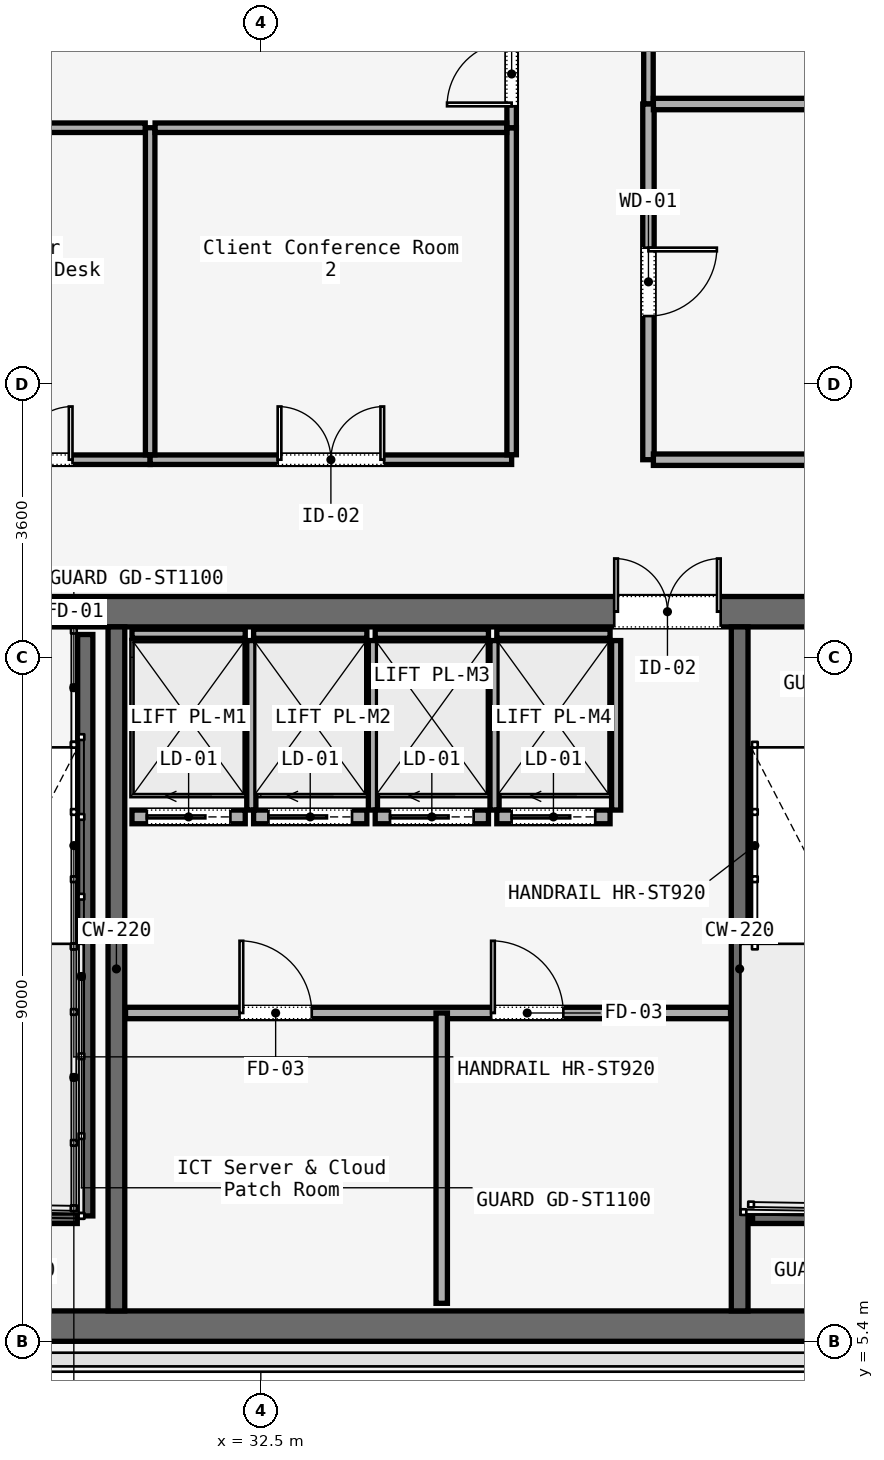
"""IFC4 building model, lengths in metres.
Left out: names, types, materials, properties, quantities, classifications, styles, units other than length and angle.
Written with IfcOpenShell. Run it as: python <this file> out.ifc"""

import sys

from ifc_helpers import new_model, si_unit, direction, frame, frame_2d, origin, place, context, subcontext, project, spatial, rectangle, extrude, element, fill, save


model = new_model("IFC4")
c1 = context("Model", 3, precision=1e-05, world=origin(), true_north=direction((0.0, 1.0)))
c2 = subcontext(c1, "Body", "Model", "MODEL_VIEW")
j1 = project(units=[si_unit("LENGTHUNIT", "METRE"), si_unit("PLANEANGLEUNIT", "RADIAN")], contexts=[c1])
p1 = place(None, origin())
s1 = spatial("IfcSite", under=j1, at=p1, CompositionType="ELEMENT")
p2 = place(p1, origin())
s2 = spatial("IfcBuilding", under=s1, at=p2, CompositionType="ELEMENT")
p3 = place(p2, frame((0.0, 0.0, 176.4)))
s3 = spatial("IfcBuildingStorey", under=s2, at=p3, CompositionType="ELEMENT", Elevation=176.4)
p4 = place(p3, frame((26.45, 15.0, 0.0), z_axis=(0.0, 0.0, 1.0), x_axis=(1.0, 0.0, 0.0)))
e1 = element("IfcWall", 1, at=p4, inside=s3, PredefinedType="SOLIDWALL", context=c2, shape_type="SweptSolid", body=[
    extrude(rectangle(XDim=31.1, YDim=0.4, at=frame_2d((15.55, 0.0))), origin(), (0.0, 0.0, 1.0), 3.58),
])
p5 = place(p4, frame((1.65, 0.0, 0.0)))
e2 = element("IfcOpeningElement", 2, at=p5, cuts=e1, PredefinedType="OPENING", context=c2, shape_type="SweptSolid", body=[
    extrude(rectangle(XDim=1.1, YDim=2.2, at=frame_2d((0.55, 1.1))), frame((0.0, 0.2, 0.0), z_axis=(0.0, -1.0, 0.0), x_axis=(1.0, 0.0, 0.0)), (0.0, 0.0, 1.0), 0.4),
])
p6 = place(p4, frame((13.65, 0.0, 0.0)))
e3 = element("IfcOpeningElement", 3, at=p6, cuts=e1, PredefinedType="OPENING", context=c2, shape_type="SweptSolid", body=[
    extrude(rectangle(XDim=1.1, YDim=2.2, at=frame_2d((0.55, 1.1))), frame((0.0, 0.2, 0.0), z_axis=(0.0, -1.0, 0.0), x_axis=(1.0, 0.0, 0.0)), (0.0, 0.0, 1.0), 0.4),
])
p7 = place(p4, frame((25.55, 0.0, 0.0)))
e4 = element("IfcOpeningElement", 4, at=p7, cuts=e1, PredefinedType="OPENING", context=c2, shape_type="SweptSolid", body=[
    extrude(rectangle(XDim=1.1, YDim=2.2, at=frame_2d((0.55, 1.1))), frame((0.0, 0.2, 0.0), z_axis=(0.0, -1.0, 0.0), x_axis=(1.0, 0.0, 0.0)), (0.0, 0.0, 1.0), 0.4),
])
p8 = place(p4, frame((10.7, 0.0, 0.0)))
e5 = element("IfcOpeningElement", 5, at=p8, cuts=e1, PredefinedType="OPENING", context=c2, shape_type="SweptSolid", body=[
    extrude(rectangle(XDim=1.4, YDim=2.2, at=frame_2d((0.7, 1.1))), frame((0.0, 0.2, 0.0), z_axis=(0.0, -1.0, 0.0), x_axis=(1.0, 0.0, 0.0)), (0.0, 0.0, 1.0), 0.4),
])
p9 = place(p4, frame((19.35, 0.0, 0.0)))
e6 = element("IfcOpeningElement", 6, at=p9, cuts=e1, PredefinedType="OPENING", context=c2, shape_type="SweptSolid", body=[
    extrude(rectangle(XDim=1.1, YDim=2.2, at=frame_2d((0.55, 1.1))), frame((0.0, 0.2, 0.0), z_axis=(0.0, -1.0, 0.0), x_axis=(1.0, 0.0, 0.0)), (0.0, 0.0, 1.0), 0.4),
])
p10 = place(p4, frame((21.4, 0.0, 0.0)))
e7 = element("IfcOpeningElement", 7, at=p10, cuts=e1, PredefinedType="OPENING", context=c2, shape_type="SweptSolid", body=[
    extrude(rectangle(XDim=0.9, YDim=2.1, at=frame_2d((0.45, 1.05))), frame((0.0, 0.2, 0.0), z_axis=(0.0, -1.0, 0.0), x_axis=(1.0, 0.0, 0.0)), (0.0, 0.0, 1.0), 0.4),
])
p11 = place(p4, frame((23.35, 0.0, 0.0)))
e8 = element("IfcOpeningElement", 8, at=p11, cuts=e1, PredefinedType="OPENING", context=c2, shape_type="SweptSolid", body=[
    extrude(rectangle(XDim=1.3, YDim=2.3, at=frame_2d((0.65, 1.15))), frame((0.0, 0.2, 0.0), z_axis=(0.0, -1.0, 0.0), x_axis=(1.0, 0.0, 0.0)), (0.0, 0.0, 1.0), 0.4),
])
p12 = place(p3, frame((26.45, 5.6, 0.0), z_axis=(0.0, 0.0, 1.0), x_axis=(1.0, 0.0, 0.0)))
e9 = element("IfcWall", 9, at=p12, inside=s3, PredefinedType="SOLIDWALL", context=c2, shape_type="SweptSolid", body=[
    extrude(rectangle(XDim=31.1, YDim=0.4, at=frame_2d((15.55, 0.0))), origin(), (0.0, 0.0, 1.0), 3.58),
])
for number, where, z_axis, x_axis in (
    (10, (30.6, 5.8, 0.0), (0.0, 0.0, 1.0), (0.0, 1.0, 0.0)),
    (11, (38.8, 5.8, 0.0), (0.0, 0.0, 1.0), (0.0, 1.0, 0.0)),
):
    element("IfcWall", number, at=place(p3, frame(where, z_axis=z_axis, x_axis=x_axis)), inside=s3, PredefinedType="SOLIDWALL", context=c2, shape_type="SweptSolid", body=[
        extrude(rectangle(XDim=9.0, YDim=0.22, at=frame_2d((4.5, 0.0))), origin(), (0.0, 0.0, 1.0), 3.58),
    ])
p13 = place(p3, frame((30.19, 14.7, 0.0), z_axis=(0.0, 0.0, 1.0), x_axis=(0.0, -1.0, 0.0)))
e12 = element("IfcWall", 12, at=p13, inside=s3, PredefinedType="SOLIDWALL", context=c2, shape_type="SweptSolid", body=[
    extrude(rectangle(XDim=7.65, YDim=0.2, at=frame_2d((3.825, 0.0))), origin(), (0.0, 0.0, 1.0), 3.8),
])
for number, where, z_axis, x_axis in (
    (13, (26.97, 7.05, 0.0), (0.0, 0.0, 1.0), (1.0, 0.0, 0.0)),
    (14, (38.97, 7.05, 0.0), (0.0, 0.0, 1.0), (1.0, 0.0, 0.0)),
):
    element("IfcWall", number, at=place(p3, frame(where, z_axis=z_axis, x_axis=x_axis)), inside=s3, PredefinedType="SOLIDWALL", context=c2, shape_type="SweptSolid", body=[
        extrude(rectangle(XDim=3.115, YDim=0.2, at=frame_2d((1.558, 0.0))), origin(), (0.0, 0.0, 1.0), 3.8),
    ])
p14 = place(p3, frame((30.72, 9.72, 0.0), z_axis=(0.0, 0.0, 1.0), x_axis=(1.0, 0.0, 0.0)))
e15 = element("IfcWall", 15, at=p14, inside=s3, PredefinedType="PARTITIONING", context=c2, shape_type="SweptSolid", body=[
    extrude(rectangle(XDim=7.96, YDim=0.15, at=frame_2d((3.98, 0.0))), origin(), (0.0, 0.0, 1.0), 3.01),
])
p15 = place(p14, frame((1.5, 0.0, 0.0)))
e16 = element("IfcOpeningElement", 16, at=p15, cuts=e15, PredefinedType="OPENING", context=c2, shape_type="SweptSolid", body=[
    extrude(rectangle(XDim=0.95, YDim=2.2, at=frame_2d((0.475, 1.1))), frame((0.0, 0.075, 0.0), z_axis=(0.0, -1.0, 0.0), x_axis=(1.0, 0.0, 0.0)), (0.0, 0.0, 1.0), 0.15),
])
p16 = place(p14, frame((4.81, 0.0, 0.0)))
e17 = element("IfcOpeningElement", 17, at=p16, cuts=e15, PredefinedType="OPENING", context=c2, shape_type="SweptSolid", body=[
    extrude(rectangle(XDim=0.95, YDim=2.2, at=frame_2d((0.475, 1.1))), frame((0.0, 0.075, 0.0), z_axis=(0.0, -1.0, 0.0), x_axis=(1.0, 0.0, 0.0)), (0.0, 0.0, 1.0), 0.15),
])
p17 = place(p3, frame((34.88, 5.9, 0.0), z_axis=(0.0, 0.0, 1.0), x_axis=(0.0, 1.0, 0.0)))
e18 = element("IfcWall", 18, at=p17, inside=s3, PredefinedType="PARTITIONING", context=c2, shape_type="SweptSolid", body=[
    extrude(rectangle(XDim=3.82, YDim=0.15, at=frame_2d((1.91, 0.0))), origin(), (0.0, 0.0, 1.0), 3.01),
])
p18 = place(p3, frame((30.805, 12.3, 0.0), z_axis=(0.0, 0.0, 1.0), x_axis=(1.0, 0.0, 0.0)))
e19 = element("IfcWall", 19, at=p18, inside=s3, PredefinedType="SOLIDWALL", context=c2, shape_type="SweptSolid", body=[
    extrude(rectangle(XDim=1.49, YDim=0.18, at=frame_2d((0.745, 0.0))), origin(), (0.0, 0.0, 1.0), 3.01),
])
p19 = place(p18, frame((0.195, 0.0, 0.0)))
e20 = element("IfcOpeningElement", 20, at=p19, cuts=e19, PredefinedType="OPENING", context=c2, shape_type="SweptSolid", body=[
    extrude(rectangle(XDim=1.1, YDim=2.2, at=frame_2d((0.55, 1.1))), frame((0.0, 0.09, 0.0), z_axis=(0.0, -1.0, 0.0), x_axis=(1.0, 0.0, 0.0)), (0.0, 0.0, 1.0), 0.18),
])
p20 = place(p3, frame((30.805, 14.71, 0.0), z_axis=(0.0, 0.0, 1.0), x_axis=(1.0, 0.0, 0.0)))
e21 = element("IfcWall", 21, at=p20, inside=s3, PredefinedType="SOLIDWALL", context=c2, shape_type="SweptSolid", body=[
    extrude(rectangle(XDim=1.49, YDim=0.12, at=frame_2d((0.745, 0.0))), origin(), (0.0, 0.0, 1.0), 3.01),
])
p21 = place(p3, frame((32.375, 12.39, 0.0), z_axis=(0.0, 0.0, 1.0), x_axis=(0.0, 1.0, 0.0)))
e22 = element("IfcWall", 22, at=p21, inside=s3, PredefinedType="SOLIDWALL", context=c2, shape_type="SweptSolid", body=[
    extrude(rectangle(XDim=2.23, YDim=0.12, at=frame_2d((1.115, 0.0))), origin(), (0.0, 0.0, 1.0), 3.01),
])
p22 = place(p3, frame((32.405, 12.3, 0.0), z_axis=(0.0, 0.0, 1.0), x_axis=(1.0, 0.0, 0.0)))
e23 = element("IfcWall", 23, at=p22, inside=s3, PredefinedType="SOLIDWALL", context=c2, shape_type="SweptSolid", body=[
    extrude(rectangle(XDim=1.49, YDim=0.18, at=frame_2d((0.745, 0.0))), origin(), (0.0, 0.0, 1.0), 3.01),
])
p23 = place(p22, frame((0.195, 0.0, 0.0)))
e24 = element("IfcOpeningElement", 24, at=p23, cuts=e23, PredefinedType="OPENING", context=c2, shape_type="SweptSolid", body=[
    extrude(rectangle(XDim=1.1, YDim=2.2, at=frame_2d((0.55, 1.1))), frame((0.0, 0.09, 0.0), z_axis=(0.0, -1.0, 0.0), x_axis=(1.0, 0.0, 0.0)), (0.0, 0.0, 1.0), 0.18),
])
p24 = place(p3, frame((32.405, 14.71, 0.0), z_axis=(0.0, 0.0, 1.0), x_axis=(1.0, 0.0, 0.0)))
e25 = element("IfcWall", 25, at=p24, inside=s3, PredefinedType="SOLIDWALL", context=c2, shape_type="SweptSolid", body=[
    extrude(rectangle(XDim=1.49, YDim=0.12, at=frame_2d((0.745, 0.0))), origin(), (0.0, 0.0, 1.0), 3.01),
])
p25 = place(p3, frame((33.975, 12.39, 0.0), z_axis=(0.0, 0.0, 1.0), x_axis=(0.0, 1.0, 0.0)))
e26 = element("IfcWall", 26, at=p25, inside=s3, PredefinedType="SOLIDWALL", context=c2, shape_type="SweptSolid", body=[
    extrude(rectangle(XDim=2.23, YDim=0.12, at=frame_2d((1.115, 0.0))), origin(), (0.0, 0.0, 1.0), 3.01),
])
p26 = place(p3, frame((34.005, 12.3, 0.0), z_axis=(0.0, 0.0, 1.0), x_axis=(1.0, 0.0, 0.0)))
e27 = element("IfcWall", 27, at=p26, inside=s3, PredefinedType="SOLIDWALL", context=c2, shape_type="SweptSolid", body=[
    extrude(rectangle(XDim=1.49, YDim=0.18, at=frame_2d((0.745, 0.0))), origin(), (0.0, 0.0, 1.0), 3.01),
])
p27 = place(p26, frame((0.195, 0.0, 0.0)))
e28 = element("IfcOpeningElement", 28, at=p27, cuts=e27, PredefinedType="OPENING", context=c2, shape_type="SweptSolid", body=[
    extrude(rectangle(XDim=1.1, YDim=2.2, at=frame_2d((0.55, 1.1))), frame((0.0, 0.09, 0.0), z_axis=(0.0, -1.0, 0.0), x_axis=(1.0, 0.0, 0.0)), (0.0, 0.0, 1.0), 0.18),
])
p28 = place(p3, frame((34.005, 14.71, 0.0), z_axis=(0.0, 0.0, 1.0), x_axis=(1.0, 0.0, 0.0)))
e29 = element("IfcWall", 29, at=p28, inside=s3, PredefinedType="SOLIDWALL", context=c2, shape_type="SweptSolid", body=[
    extrude(rectangle(XDim=1.49, YDim=0.12, at=frame_2d((0.745, 0.0))), origin(), (0.0, 0.0, 1.0), 3.01),
])
p29 = place(p3, frame((35.575, 12.39, 0.0), z_axis=(0.0, 0.0, 1.0), x_axis=(0.0, 1.0, 0.0)))
e30 = element("IfcWall", 30, at=p29, inside=s3, PredefinedType="SOLIDWALL", context=c2, shape_type="SweptSolid", body=[
    extrude(rectangle(XDim=2.23, YDim=0.12, at=frame_2d((1.115, 0.0))), origin(), (0.0, 0.0, 1.0), 3.01),
])
p30 = place(p3, frame((35.605, 12.3, 0.0), z_axis=(0.0, 0.0, 1.0), x_axis=(1.0, 0.0, 0.0)))
e31 = element("IfcWall", 31, at=p30, inside=s3, PredefinedType="SOLIDWALL", context=c2, shape_type="SweptSolid", body=[
    extrude(rectangle(XDim=1.49, YDim=0.18, at=frame_2d((0.745, 0.0))), origin(), (0.0, 0.0, 1.0), 3.01),
])
p31 = place(p30, frame((0.195, 0.0, 0.0)))
e32 = element("IfcOpeningElement", 32, at=p31, cuts=e31, PredefinedType="OPENING", context=c2, shape_type="SweptSolid", body=[
    extrude(rectangle(XDim=1.1, YDim=2.2, at=frame_2d((0.55, 1.1))), frame((0.0, 0.09, 0.0), z_axis=(0.0, -1.0, 0.0), x_axis=(1.0, 0.0, 0.0)), (0.0, 0.0, 1.0), 0.18),
])
p32 = place(p3, frame((35.605, 14.71, 0.0), z_axis=(0.0, 0.0, 1.0), x_axis=(1.0, 0.0, 0.0)))
e33 = element("IfcWall", 33, at=p32, inside=s3, PredefinedType="SOLIDWALL", context=c2, shape_type="SweptSolid", body=[
    extrude(rectangle(XDim=1.49, YDim=0.12, at=frame_2d((0.745, 0.0))), origin(), (0.0, 0.0, 1.0), 3.01),
])
p33 = place(p3, frame((37.175, 12.39, 0.0), z_axis=(0.0, 0.0, 1.0), x_axis=(0.0, 1.0, 0.0)))
e34 = element("IfcWall", 34, at=p33, inside=s3, PredefinedType="SOLIDWALL", context=c2, shape_type="SweptSolid", body=[
    extrude(rectangle(XDim=2.23, YDim=0.12, at=frame_2d((1.115, 0.0))), origin(), (0.0, 0.0, 1.0), 3.01),
])
p34 = place(p3, frame((27.6, 17.0, 0.0), z_axis=(0.0, 0.0, 1.0), x_axis=(1.0, 0.0, 0.0)))
e35 = element("IfcWall", 35, at=p34, inside=s3, PredefinedType="PARTITIONING", context=c2, shape_type="SweptSolid", body=[
    extrude(rectangle(XDim=3.444, YDim=0.125, at=frame_2d((1.722, 0.0))), origin(), (0.0, 0.0, 1.0), 3.01),
])
p35 = place(p34, frame((1.022, 0.0, 0.0)))
e36 = element("IfcOpeningElement", 36, at=p35, cuts=e35, PredefinedType="OPENING", context=c2, shape_type="SweptSolid", body=[
    extrude(rectangle(XDim=1.4, YDim=2.2, at=frame_2d((0.7, 1.1))), frame((0.0, 0.062, 0.0), z_axis=(0.0, -1.0, 0.0), x_axis=(1.0, 0.0, 0.0)), (0.0, 0.0, 1.0), 0.125),
])
p36 = place(p3, frame((31.044, 17.0, 0.0), z_axis=(0.0, 0.0, 1.0), x_axis=(1.0, 0.0, 0.0)))
e37 = element("IfcWall", 37, at=p36, inside=s3, PredefinedType="PARTITIONING", context=c2, shape_type="SweptSolid", body=[
    extrude(rectangle(XDim=4.756, YDim=0.125, at=frame_2d((2.378, 0.0))), origin(), (0.0, 0.0, 1.0), 3.01),
])
p37 = place(p36, frame((1.678, 0.0, 0.0)))
e38 = element("IfcOpeningElement", 38, at=p37, cuts=e37, PredefinedType="OPENING", context=c2, shape_type="SweptSolid", body=[
    extrude(rectangle(XDim=1.4, YDim=2.2, at=frame_2d((0.7, 1.1))), frame((0.0, 0.062, 0.0), z_axis=(0.0, -1.0, 0.0), x_axis=(1.0, 0.0, 0.0)), (0.0, 0.0, 1.0), 0.125),
])
p38 = place(p3, frame((35.8, 17.065, 0.0), z_axis=(0.0, 0.0, 1.0), x_axis=(0.0, 1.0, 0.0)))
e39 = element("IfcWall", 39, at=p38, inside=s3, PredefinedType="PARTITIONING", context=c2, shape_type="SweptSolid", body=[
    extrude(rectangle(XDim=4.303, YDim=0.125, at=frame_2d((2.151, 0.0))), origin(), (0.0, 0.0, 1.0), 3.01),
])
p39 = place(p3, frame((35.8, 21.368, 0.0), z_axis=(0.0, 0.0, 1.0), x_axis=(0.0, 1.0, 0.0)))
e40 = element("IfcWall", 40, at=p39, inside=s3, PredefinedType="PARTITIONING", context=c2, shape_type="SweptSolid", body=[
    extrude(rectangle(XDim=2.715, YDim=0.125, at=frame_2d((1.357, 0.0))), origin(), (0.0, 0.0, 1.0), 3.01),
])
p40 = place(p39, frame((0.282, 0.0, 0.0)))
e41 = element("IfcOpeningElement", 41, at=p40, cuts=e40, PredefinedType="OPENING", context=c2, shape_type="SweptSolid", body=[
    extrude(rectangle(XDim=0.85, YDim=2.15, at=frame_2d((0.425, 1.075))), frame((0.0, 0.062, 0.0), z_axis=(0.0, -1.0, 0.0), x_axis=(1.0, 0.0, 0.0)), (0.0, 0.0, 1.0), 0.125),
])
p41 = place(p3, frame((37.6, 27.4, 0.0), z_axis=(0.0, 0.0, 1.0), x_axis=(0.0, -1.0, 0.0)))
e42 = element("IfcWall", 42, at=p41, inside=s3, PredefinedType="PARTITIONING", context=c2, shape_type="SweptSolid", body=[
    extrude(rectangle(XDim=5.72, YDim=0.125, at=frame_2d((2.86, 0.0))), origin(), (0.0, 0.0, 1.0), 3.01),
])
p42 = place(p41, frame((2.385, 0.0, 0.0)))
e43 = element("IfcOpeningElement", 43, at=p42, cuts=e42, PredefinedType="OPENING", context=c2, shape_type="SweptSolid", body=[
    extrude(rectangle(XDim=0.95, YDim=2.2, at=frame_2d((0.475, 1.1))), frame((0.0, 0.062, 0.0), z_axis=(0.0, -1.0, 0.0), x_axis=(1.0, 0.0, 0.0)), (0.0, 0.0, 1.0), 0.125),
])
p43 = place(p3, frame((37.6, 21.68, 0.0), z_axis=(0.0, 0.0, 1.0), x_axis=(0.0, -1.0, 0.0)))
e44 = element("IfcWall", 44, at=p43, inside=s3, PredefinedType="PARTITIONING", context=c2, shape_type="SweptSolid", body=[
    extrude(rectangle(XDim=4.68, YDim=0.15, at=frame_2d((2.34, 0.0))), origin(), (0.0, 0.0, 1.0), 3.01),
])
p44 = place(p43, frame((1.89, 0.0, 0.0)))
e45 = element("IfcOpeningElement", 45, at=p44, cuts=e44, PredefinedType="OPENING", context=c2, shape_type="SweptSolid", body=[
    extrude(rectangle(XDim=0.9, YDim=2.15, at=frame_2d((0.45, 1.075))), frame((0.0, 0.075, 0.0), z_axis=(0.0, -1.0, 0.0), x_axis=(1.0, 0.0, 0.0)), (0.0, 0.0, 1.0), 0.15),
])
p45 = place(p3, frame((37.665, 17.0, 0.0), z_axis=(0.0, 0.0, 1.0), x_axis=(1.0, 0.0, 0.0)))
e46 = element("IfcWall", 46, at=p45, inside=s3, PredefinedType="PARTITIONING", context=c2, shape_type="SweptSolid", body=[
    extrude(rectangle(XDim=3.985, YDim=0.15, at=frame_2d((1.992, 0.0))), origin(), (0.0, 0.0, 1.0), 3.01),
])
p46 = place(p3, frame((31.044, 21.368, 0.0), z_axis=(0.0, 0.0, 1.0), x_axis=(0.0, -1.0, 0.0)))
e47 = element("IfcWall", 47, at=p46, inside=s3, PredefinedType="PARTITIONING", context=c2, shape_type="SweptSolid", body=[
    extrude(rectangle(XDim=4.303, YDim=0.125, at=frame_2d((2.151, 0.0))), origin(), (0.0, 0.0, 1.0), 3.01),
])
p47 = place(p3, frame((27.665, 21.368, 0.0), z_axis=(0.0, 0.0, 1.0), x_axis=(1.0, 0.0, 0.0)))
e48 = element("IfcWall", 48, at=p47, inside=s3, PredefinedType="PARTITIONING", context=c2, shape_type="SweptSolid", body=[
    extrude(rectangle(XDim=3.314, YDim=0.125, at=frame_2d((1.657, 0.0))), origin(), (0.0, 0.0, 1.0), 3.01),
])
p48 = place(p3, frame((31.109, 21.368, 0.0), z_axis=(0.0, 0.0, 1.0), x_axis=(1.0, 0.0, 0.0)))
e49 = element("IfcWall", 49, at=p48, inside=s3, PredefinedType="PARTITIONING", context=c2, shape_type="SweptSolid", body=[
    extrude(rectangle(XDim=4.626, YDim=0.125, at=frame_2d((2.313, 0.0))), origin(), (0.0, 0.0, 1.0), 3.01),
])
p49 = place(p3, frame((37.665, 21.68, 0.0), z_axis=(0.0, 0.0, 1.0), x_axis=(1.0, 0.0, 0.0)))
e50 = element("IfcWall", 50, at=p49, inside=s3, PredefinedType="PARTITIONING", context=c2, shape_type="SweptSolid", body=[
    extrude(rectangle(XDim=3.715, YDim=0.15, at=frame_2d((1.857, 0.0))), origin(), (0.0, 0.0, 1.0), 3.01),
])
p50 = place(p8, origin())
e51 = element("IfcDoor", 51, at=p50, inside=s3, OperationType="DOUBLE_DOOR_SINGLE_SWING", PredefinedType="DOOR", context=c2, shape_type="SweptSolid", body=[
    extrude(rectangle(XDim=1.4, YDim=2.2, at=frame_2d((0.7, 1.1))), frame((0.0, 0.025, 0.0), z_axis=(0.0, -1.0, 0.0), x_axis=(1.0, 0.0, 0.0)), (0.0, 0.0, 1.0), 0.05),
])
fill(e5, e51)
p51 = place(p15, origin())
e52 = element("IfcDoor", 52, at=p51, inside=s3, OperationType="SINGLE_SWING_LEFT", PredefinedType="DOOR", context=c2, shape_type="SweptSolid", body=[
    extrude(rectangle(XDim=0.95, YDim=2.2, at=frame_2d((0.475, 1.1))), frame((0.0, 0.025, 0.0), z_axis=(0.0, -1.0, 0.0), x_axis=(1.0, 0.0, 0.0)), (0.0, 0.0, 1.0), 0.05),
])
fill(e16, e52)
p52 = place(p16, origin())
e53 = element("IfcDoor", 53, at=p52, inside=s3, OperationType="SINGLE_SWING_RIGHT", PredefinedType="DOOR", context=c2, shape_type="SweptSolid", body=[
    extrude(rectangle(XDim=0.95, YDim=2.2, at=frame_2d((0.475, 1.1))), frame((0.0, 0.025, 0.0), z_axis=(0.0, -1.0, 0.0), x_axis=(1.0, 0.0, 0.0)), (0.0, 0.0, 1.0), 0.05),
])
fill(e17, e53)
p53 = place(p19, origin())
e54 = element("IfcDoor", 54, at=p53, inside=s3, OperationType="SLIDING_TO_LEFT", PredefinedType="DOOR", context=c2, shape_type="SweptSolid", body=[
    extrude(rectangle(XDim=1.1, YDim=2.2, at=frame_2d((0.55, 1.1))), frame((0.0, 0.025, 0.0), z_axis=(0.0, -1.0, 0.0), x_axis=(1.0, 0.0, 0.0)), (0.0, 0.0, 1.0), 0.05),
])
fill(e20, e54)
p54 = place(p23, origin())
e55 = element("IfcDoor", 55, at=p54, inside=s3, OperationType="SLIDING_TO_LEFT", PredefinedType="DOOR", context=c2, shape_type="SweptSolid", body=[
    extrude(rectangle(XDim=1.1, YDim=2.2, at=frame_2d((0.55, 1.1))), frame((0.0, 0.025, 0.0), z_axis=(0.0, -1.0, 0.0), x_axis=(1.0, 0.0, 0.0)), (0.0, 0.0, 1.0), 0.05),
])
fill(e24, e55)
p55 = place(p27, origin())
e56 = element("IfcDoor", 56, at=p55, inside=s3, OperationType="SLIDING_TO_LEFT", PredefinedType="DOOR", context=c2, shape_type="SweptSolid", body=[
    extrude(rectangle(XDim=1.1, YDim=2.2, at=frame_2d((0.55, 1.1))), frame((0.0, 0.025, 0.0), z_axis=(0.0, -1.0, 0.0), x_axis=(1.0, 0.0, 0.0)), (0.0, 0.0, 1.0), 0.05),
])
fill(e28, e56)
p56 = place(p31, origin())
e57 = element("IfcDoor", 57, at=p56, inside=s3, OperationType="SLIDING_TO_LEFT", PredefinedType="DOOR", context=c2, shape_type="SweptSolid", body=[
    extrude(rectangle(XDim=1.1, YDim=2.2, at=frame_2d((0.55, 1.1))), frame((0.0, 0.025, 0.0), z_axis=(0.0, -1.0, 0.0), x_axis=(1.0, 0.0, 0.0)), (0.0, 0.0, 1.0), 0.05),
])
fill(e32, e57)
p57 = place(p35, origin())
e58 = element("IfcDoor", 58, at=p57, inside=s3, OperationType="SINGLE_SWING_RIGHT", PredefinedType="DOOR", context=c2, shape_type="SweptSolid", body=[
    extrude(rectangle(XDim=1.4, YDim=2.2, at=frame_2d((0.7, 1.1))), frame((0.0, 0.025, 0.0), z_axis=(0.0, -1.0, 0.0), x_axis=(1.0, 0.0, 0.0)), (0.0, 0.0, 1.0), 0.05),
])
fill(e36, e58)
p58 = place(p37, origin())
e59 = element("IfcDoor", 59, at=p58, inside=s3, OperationType="SINGLE_SWING_LEFT", PredefinedType="DOOR", context=c2, shape_type="SweptSolid", body=[
    extrude(rectangle(XDim=1.4, YDim=2.2, at=frame_2d((0.7, 1.1))), frame((0.0, 0.025, 0.0), z_axis=(0.0, -1.0, 0.0), x_axis=(1.0, 0.0, 0.0)), (0.0, 0.0, 1.0), 0.05),
])
fill(e38, e59)
p59 = place(p44, origin())
e60 = element("IfcDoor", 60, at=p59, inside=s3, OperationType="SINGLE_SWING_RIGHT", PredefinedType="DOOR", context=c2, shape_type="SweptSolid", body=[
    extrude(rectangle(XDim=0.9, YDim=2.15, at=frame_2d((0.45, 1.075))), frame((0.0, 0.025, 0.0), z_axis=(0.0, -1.0, 0.0), x_axis=(1.0, 0.0, 0.0)), (0.0, 0.0, 1.0), 0.05),
])
fill(e45, e60)
p60 = place(p40, origin())
e61 = element("IfcDoor", 61, at=p60, inside=s3, OperationType="SINGLE_SWING_LEFT", PredefinedType="DOOR", context=c2, shape_type="SweptSolid", body=[
    extrude(rectangle(XDim=0.85, YDim=2.15, at=frame_2d((0.425, 1.075))), frame((0.0, 0.025, 0.0), z_axis=(0.0, -1.0, 0.0), x_axis=(1.0, 0.0, 0.0)), (0.0, 0.0, 1.0), 0.05),
])
fill(e41, e61)
save(model, sys.argv[1])
